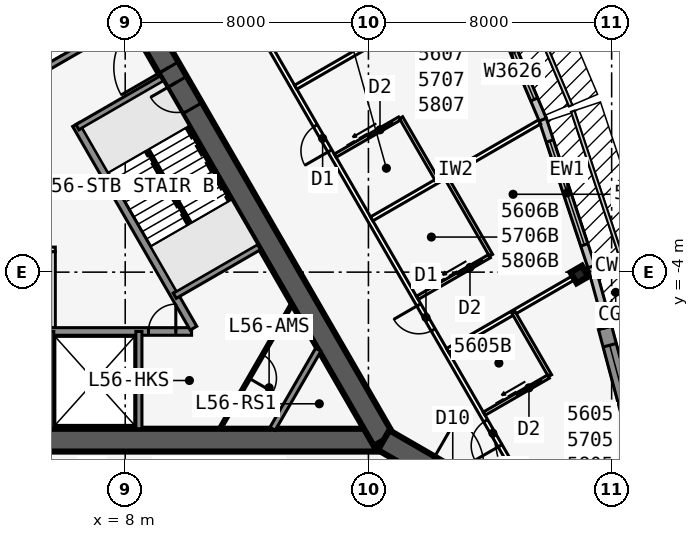
"""IFC4 building model, lengths in metres.
Left out: names, types, materials, properties, quantities, classifications, styles, units other than length and angle.
Written with IfcOpenShell. Run it as: python <this file> out.ifc"""

import sys

from ifc_helpers import new_model, si_unit, direction, frame, frame_2d, origin, origin_2d, place, context, subcontext, project, spatial, polyline, rectangle, i_section, outline, extrude, element, fill, save


model = new_model("IFC4")
c1 = context("Model", 3, precision=1e-05, world=origin(), true_north=direction((0.0, 1.0)))
c2 = subcontext(c1, "Body", "Model", "MODEL_VIEW")
j1 = project(units=[si_unit("LENGTHUNIT", "METRE"), si_unit("PLANEANGLEUNIT", "RADIAN")], contexts=[c1])
p1 = place(None, origin())
s1 = spatial("IfcSite", under=j1, at=p1, CompositionType="ELEMENT")
p2 = place(p1, origin())
s2 = spatial("IfcBuilding", under=s1, at=p2, CompositionType="ELEMENT")
p3 = place(p2, frame((0.0, 0.0, 211.7)))
s3 = spatial("IfcBuildingStorey", under=s2, at=p3, CompositionType="ELEMENT", Elevation=211.7)
p4 = place(p3, frame((-16.5, -9.526, 0.0), z_axis=(0.0, 0.0, 1.0), x_axis=(1.0, 0.0, 0.0)))
e1 = element("IfcWall", 1, at=p4, inside=s3, PredefinedType="SHEAR", context=c2, shape_type="SweptSolid", body=[
    extrude(rectangle(XDim=33.0, YDim=0.75, at=frame_2d((16.5, 0.0))), origin(), (0.0, 0.0, 1.0), 3.6),
])
p5 = place(p4, frame((14.05, 0.0, 0.0)))
e2 = element("IfcOpeningElement", 2, at=p5, cuts=e1, PredefinedType="OPENING", context=c2, shape_type="SweptSolid", body=[
    extrude(rectangle(XDim=1.8, YDim=2.13, at=frame_2d((0.9, 1.065))), frame((0.0, 0.385, 0.0), z_axis=(0.0, -1.0, 0.0), x_axis=(1.0, 0.0, 0.0)), (0.0, 0.0, 1.0), 0.77),
])
p6 = place(p3, frame((-0.55, -5.951, 0.0), z_axis=(0.0, 0.0, 1.0), x_axis=(1.0, 0.0, 0.0)))
e3 = element("IfcWall", 3, at=p6, inside=s3, PredefinedType="SOLIDWALL", context=c2, shape_type="SweptSolid", body=[
    extrude(rectangle(XDim=10.733, YDim=0.25, at=frame_2d((5.366, 0.0))), origin(), (0.0, 0.0, 1.0), 3.435),
])
p7 = place(p6, frame((9.314, 0.0, 0.0)))
e4 = element("IfcOpeningElement", 4, at=p7, cuts=e3, PredefinedType="OPENING", context=c2, shape_type="SweptSolid", body=[
    extrude(rectangle(XDim=0.9, YDim=2.13, at=frame_2d((0.45, 1.065))), frame((0.0, 0.135, 0.0), z_axis=(0.0, -1.0, 0.0), x_axis=(1.0, 0.0, 0.0)), (0.0, 0.0, 1.0), 0.27),
])
p8 = place(p6, frame((1.05, 0.0, 0.0)))
e5 = element("IfcOpeningElement", 5, at=p8, cuts=e3, PredefinedType="OPENING", context=c2, shape_type="SweptSolid", body=[
    extrude(rectangle(XDim=1.1, YDim=2.13, at=frame_2d((0.55, 1.065))), frame((0.0, 0.135, 0.0), z_axis=(0.0, -1.0, 0.0), x_axis=(1.0, 0.0, 0.0)), (0.0, 0.0, 1.0), 0.27),
])
p9 = place(p6, frame((4.05, 0.0, 0.0)))
e6 = element("IfcOpeningElement", 6, at=p9, cuts=e3, PredefinedType="OPENING", context=c2, shape_type="SweptSolid", body=[
    extrude(rectangle(XDim=1.1, YDim=2.13, at=frame_2d((0.55, 1.065))), frame((0.0, 0.135, 0.0), z_axis=(0.0, -1.0, 0.0), x_axis=(1.0, 0.0, 0.0)), (0.0, 0.0, 1.0), 0.27),
])
for number, where, z_axis, x_axis in (
    (7, (5.55, -5.951, 0.0), (0.0, 0.0, 1.0), (0.0, -1.0, 0.0)),
    (8, (8.45, -5.951, 0.0), (0.0, 0.0, 1.0), (0.0, -1.0, 0.0)),
):
    element("IfcWall", number, at=place(p3, frame(where, z_axis=z_axis, x_axis=x_axis)), inside=s3, PredefinedType="SOLIDWALL", context=c2, shape_type="SweptSolid", body=[
        extrude(rectangle(XDim=3.2, YDim=0.2, at=frame_2d((1.6, 0.0))), origin(), (0.0, 0.0, 1.0), 3.435),
    ])
p10 = place(p3, frame((16.5, -9.526, 0.0), z_axis=(0.0, 0.0, 1.0), x_axis=(-0.499999749417, 0.866025548458, 0.0)))
e9 = element("IfcWall", 9, at=p10, inside=s3, PredefinedType="SHEAR", context=c2, shape_type="SweptSolid", body=[
    extrude(rectangle(XDim=33.0, YDim=0.75, at=frame_2d((16.5, 0.0))), origin(), (0.0, 0.0, 1.0), 3.6),
])
p11 = place(p10, frame((14.15, 0.0, 0.0)))
e10 = element("IfcOpeningElement", 10, at=p11, cuts=e9, PredefinedType="OPENING", context=c2, shape_type="SweptSolid", body=[
    extrude(rectangle(XDim=1.8, YDim=2.13, at=frame_2d((0.9, 1.065))), frame((0.0, 0.385, 0.0), z_axis=(0.0, -1.0, 0.0), x_axis=(1.0, 0.0, 0.0)), (0.0, 0.0, 1.0), 0.77),
])
p12 = place(p10, frame((12.6, 0.0, 0.0)))
e11 = element("IfcOpeningElement", 11, at=p12, cuts=e9, PredefinedType="OPENING", context=c2, shape_type="SweptSolid", body=[
    extrude(rectangle(XDim=1.0, YDim=2.13, at=frame_2d((0.5, 1.065))), frame((0.0, 0.385, 0.0), z_axis=(0.0, -1.0, 0.0), x_axis=(1.0, 0.0, 0.0)), (0.0, 0.0, 1.0), 0.77),
])
p13 = place(p3, frame((10.245, -5.843, 0.0), z_axis=(0.0, 0.0, 1.0), x_axis=(-0.499993009313, 0.866029439822, 0.0)))
e12 = element("IfcWall", 12, at=p13, inside=s3, PredefinedType="SOLIDWALL", context=c2, shape_type="SweptSolid", body=[
    extrude(rectangle(XDim=7.733, YDim=0.25, at=frame_2d((3.866, 0.0))), origin(), (0.0, 0.0, 1.0), 3.435),
])
for number, where, z_axis, x_axis in (
    (13, (9.629, -4.775, 0.0), (0.0, 0.0, 1.0), (0.866, 0.5, 0.0)),
    (14, (6.429, 0.767, 0.0), (0.0, 0.0, 1.0), (0.866, 0.5, 0.0)),
):
    element("IfcWall", number, at=place(p3, frame(where, z_axis=z_axis, x_axis=x_axis)), inside=s3, PredefinedType="SOLIDWALL", context=c2, shape_type="SweptSolid", body=[
        extrude(rectangle(XDim=3.2, YDim=0.2, at=frame_2d((1.6, 0.0))), origin(), (0.0, 0.0, 1.0), 3.435),
    ])
p14 = place(p3, frame((5.329, 2.673, 0.0), z_axis=(0.0, 0.0, 1.0), x_axis=(0.866022944154, 0.50000426018, 0.0)))
e15 = element("IfcWall", 15, at=p14, inside=s3, PredefinedType="SOLIDWALL", context=c2, shape_type="SweptSolid", body=[
    extrude(rectangle(XDim=3.2, YDim=0.2, at=frame_2d((1.6, 0.0))), origin(), (0.0, 0.0, 1.0), 3.435),
])
p15 = place(p3, frame((16.5, -9.526, 0.0), z_axis=(0.0, 0.0, 1.0), x_axis=(0.866031398331, -0.499989616998, 0.0)))
e16 = element("IfcWall", 16, at=p15, inside=s3, PredefinedType="SHEAR", context=c2, shape_type="SweptSolid", body=[
    extrude(rectangle(XDim=4.746, YDim=0.75, at=frame_2d((2.373, 0.0))), origin(), (0.0, 0.0, 1.0), 3.6),
])
p16 = place(p15, frame((1.725, 0.0, 0.0)))
e17 = element("IfcOpeningElement", 17, at=p16, cuts=e16, PredefinedType="OPENING", context=c2, shape_type="SweptSolid", body=[
    extrude(rectangle(XDim=1.8, YDim=2.13, at=frame_2d((0.9, 1.065))), frame((0.0, 0.385, 0.0), z_axis=(0.0, -1.0, 0.0), x_axis=(1.0, 0.0, 0.0)), (0.0, 0.0, 1.0), 0.77),
])
p17 = place(p3, frame((22.937, -4.078, 0.0), z_axis=(0.0, 0.0, 1.0), x_axis=(-0.5, 0.866025403784, 0.0)))
e18 = element("IfcColumn", 18, at=p17, inside=s3, PredefinedType="COLUMN", context=c2, shape_type="SweptSolid", body=[
    extrude(i_section(OverallWidth=0.411, OverallDepth=0.434, WebThickness=0.036, FlangeThickness=0.057, at=origin_2d()), origin(), (0.0, 0.0, 1.0), 3.6),
])
p18 = place(p3, frame((23.783, -13.798, 0.0), z_axis=(0.0, 0.0, 1.0), x_axis=(0.258799282522, 0.96593112144, 0.0)))
e19 = element("IfcWall", 19, at=p18, inside=s3, PredefinedType="SOLIDWALL", context=c2, shape_type="SweptSolid", body=[
    extrude(outline(polyline([(4.184, 0.225), (0.509, 0.225), (0.479, 0.113), (0.059, 0.225), (0.0, 0.225), (0.0, -0.225), (4.184, -0.225), (4.184, 0.225)])), origin(), (0.0, 0.0, 1.0), 3.435),
])
p19 = place(p18, frame((1.071, 0.0, 0.45)))
e20 = element("IfcOpeningElement", 20, at=p19, cuts=e19, PredefinedType="OPENING", context=c2, shape_type="SweptSolid", body=[
    extrude(rectangle(XDim=2.4, YDim=2.6, at=frame_2d((1.2, 1.3))), frame((0.0, 0.235, 0.0), z_axis=(0.0, -1.0, 0.0), x_axis=(1.0, 0.0, 0.0)), (0.0, 0.0, 1.0), 0.47),
])
p20 = place(p3, frame((24.865, -9.873, 0.0), z_axis=(0.0, 0.0, 1.0), x_axis=(-0.258784695888, 0.965935029479, 0.0)))
e21 = element("IfcWall", 21, at=p20, inside=s3, PredefinedType="SOLIDWALL", context=c2, shape_type="SweptSolid", body=[
    extrude(rectangle(XDim=4.184, YDim=0.45, at=frame_2d((2.092, 0.0))), origin(), (0.0, 0.0, 1.0), 3.435),
])
p21 = place(p20, frame((0.592, 0.0, 0.45)))
e22 = element("IfcOpeningElement", 22, at=p21, cuts=e21, PredefinedType="OPENING", context=c2, shape_type="SweptSolid", body=[
    extrude(rectangle(XDim=3.0, YDim=2.6, at=frame_2d((1.5, 1.3))), frame((0.0, 0.235, 0.0), z_axis=(0.0, -1.0, 0.0), x_axis=(1.0, 0.0, 0.0)), (0.0, 0.0, 1.0), 0.47),
])
p22 = place(p3, frame((23.879, -5.806, 0.0), z_axis=(0.0, 0.0, 1.0), x_axis=(-0.262867703986, 0.964831887015, 0.0)))
e23 = element("IfcWall", 23, at=p22, inside=s3, PredefinedType="STANDARD", context=c2, shape_type="SweptSolid", body=[
    extrude(rectangle(XDim=2.068, YDim=0.25, at=frame_2d((1.034, 0.0))), origin(), (0.0, 0.0, 1.0), 3.435),
])
p23 = place(p3, frame((23.338, -3.817, 0.0), z_axis=(0.0, 0.0, 1.0), x_axis=(-0.315108478109, 0.949055660656, 0.0)))
e24 = element("IfcWall", 24, at=p23, inside=s3, PredefinedType="STANDARD", context=c2, shape_type="SweptSolid", body=[
    extrude(rectangle(XDim=5.105, YDim=0.25, at=frame_2d((2.552, 0.0))), origin(), (0.0, 0.0, 1.0), 3.435),
])
p24 = place(p23, frame((0.752, 0.0, 0.45)))
e25 = element("IfcOpeningElement", 25, at=p24, cuts=e24, PredefinedType="OPENING", context=c2, shape_type="SweptSolid", body=[
    extrude(rectangle(XDim=3.6, YDim=2.6, at=frame_2d((1.8, 1.3))), frame((0.0, 0.135, 0.0), z_axis=(0.0, -1.0, 0.0), x_axis=(1.0, 0.0, 0.0)), (0.0, 0.0, 1.0), 0.27),
])
p25 = place(p3, frame((21.733, 1.018, 0.0), z_axis=(0.0, 0.0, 1.0), x_axis=(-0.390096809471, 0.920773848044, 0.0)))
e26 = element("IfcWall", 26, at=p25, inside=s3, PredefinedType="STANDARD", context=c2, shape_type="SweptSolid", body=[
    extrude(rectangle(XDim=5.038, YDim=0.25, at=frame_2d((2.519, 0.0))), origin(), (0.0, 0.0, 1.0), 3.435),
])
p26 = place(p25, frame((0.719, 0.0, 0.45)))
e27 = element("IfcOpeningElement", 27, at=p26, cuts=e26, PredefinedType="OPENING", context=c2, shape_type="SweptSolid", body=[
    extrude(rectangle(XDim=3.6, YDim=2.6, at=frame_2d((1.8, 1.3))), frame((0.0, 0.135, 0.0), z_axis=(0.0, -1.0, 0.0), x_axis=(1.0, 0.0, 0.0)), (0.0, 0.0, 1.0), 0.27),
])
p27 = place(p3, frame((21.661, -12.015, 0.0), z_axis=(0.0, 0.0, 1.0), x_axis=(-0.500000605707, 0.866025054079, 0.0)))
e28 = element("IfcWall", 28, at=p27, inside=s3, PredefinedType="PARTITIONING", context=c2, shape_type="SweptSolid", body=[
    extrude(rectangle(XDim=42.472, YDim=0.15, at=frame_2d((21.236, 0.0))), origin(), (0.0, 0.0, 1.0), 3.435),
])
p28 = place(p27, frame((2.661, 0.0, 0.0)))
e29 = element("IfcOpeningElement", 29, at=p28, cuts=e28, PredefinedType="OPENING", context=c2, shape_type="SweptSolid", body=[
    extrude(rectangle(XDim=0.95, YDim=2.13, at=frame_2d((0.475, 1.065))), frame((0.0, 0.085, 0.0), z_axis=(0.0, -1.0, 0.0), x_axis=(1.0, 0.0, 0.0)), (0.0, 0.0, 1.0), 0.17),
])
p29 = place(p27, frame((7.061, 0.0, 0.0)))
e30 = element("IfcOpeningElement", 30, at=p29, cuts=e28, PredefinedType="OPENING", context=c2, shape_type="SweptSolid", body=[
    extrude(rectangle(XDim=0.95, YDim=2.13, at=frame_2d((0.475, 1.065))), frame((0.0, 0.085, 0.0), z_axis=(0.0, -1.0, 0.0), x_axis=(1.0, 0.0, 0.0)), (0.0, 0.0, 1.0), 0.17),
])
p30 = place(p27, frame((13.861, 0.0, 0.0)))
e31 = element("IfcOpeningElement", 31, at=p30, cuts=e28, PredefinedType="OPENING", context=c2, shape_type="SweptSolid", body=[
    extrude(rectangle(XDim=0.95, YDim=2.13, at=frame_2d((0.475, 1.065))), frame((0.0, 0.085, 0.0), z_axis=(0.0, -1.0, 0.0), x_axis=(1.0, 0.0, 0.0)), (0.0, 0.0, 1.0), 0.17),
])
p31 = place(p27, frame((22.061, 0.0, 0.0)))
e32 = element("IfcOpeningElement", 32, at=p31, cuts=e28, PredefinedType="OPENING", context=c2, shape_type="SweptSolid", body=[
    extrude(rectangle(XDim=0.95, YDim=2.13, at=frame_2d((0.475, 1.065))), frame((0.0, 0.085, 0.0), z_axis=(0.0, -1.0, 0.0), x_axis=(1.0, 0.0, 0.0)), (0.0, 0.0, 1.0), 0.17),
])
p32 = place(p27, frame((28.261, 0.0, 0.0)))
e33 = element("IfcOpeningElement", 33, at=p32, cuts=e28, PredefinedType="OPENING", context=c2, shape_type="SweptSolid", body=[
    extrude(rectangle(XDim=0.95, YDim=2.13, at=frame_2d((0.475, 1.065))), frame((0.0, 0.085, 0.0), z_axis=(0.0, -1.0, 0.0), x_axis=(1.0, 0.0, 0.0)), (0.0, 0.0, 1.0), 0.17),
])
p33 = place(p27, frame((38.861, 0.0, 0.0)))
e34 = element("IfcOpeningElement", 34, at=p33, cuts=e28, PredefinedType="OPENING", context=c2, shape_type="SweptSolid", body=[
    extrude(rectangle(XDim=0.95, YDim=2.13, at=frame_2d((0.475, 1.065))), frame((0.0, 0.085, 0.0), z_axis=(0.0, -1.0, 0.0), x_axis=(1.0, 0.0, 0.0)), (0.0, 0.0, 1.0), 0.17),
])
p34 = place(p3, frame((18.608, -6.577, 0.0), z_axis=(0.0, 0.0, 1.0), x_axis=(0.866028745538, 0.499994211868, 0.0)))
e35 = element("IfcWall", 35, at=p34, inside=s3, PredefinedType="PARTITIONING", context=c2, shape_type="SweptSolid", body=[
    extrude(rectangle(XDim=5.34, YDim=0.15, at=frame_2d((2.67, 0.0))), origin(), (0.0, 0.0, 1.0), 2.589),
])
p35 = place(p3, frame((16.108, -2.247, 0.0), z_axis=(0.0, 0.0, 1.0), x_axis=(0.866035028144, 0.499983329749, 0.0)))
e36 = element("IfcWall", 36, at=p35, inside=s3, PredefinedType="PARTITIONING", context=c2, shape_type="SweptSolid", body=[
    extrude(rectangle(XDim=6.373, YDim=0.15, at=frame_2d((3.187, 0.0))), origin(), (0.0, 0.0, 1.0), 2.589),
])
p36 = place(p3, frame((13.608, 2.083, 0.0), z_axis=(0.0, 0.0, 1.0), x_axis=(0.866032701937, 0.499987359016, 0.0)))
e37 = element("IfcWall", 37, at=p36, inside=s3, PredefinedType="PARTITIONING", context=c2, shape_type="SweptSolid", body=[
    extrude(rectangle(XDim=6.994, YDim=0.15, at=frame_2d((3.497, 0.0))), origin(), (0.0, 0.0, 1.0), 2.589),
])
p37 = place(p3, frame((21.973, -7.406, 0.0), z_axis=(0.0, 0.0, 1.0), x_axis=(-0.499957262057, 0.866050077142, 0.0)))
e38 = element("IfcWall", 38, at=p37, inside=s3, PredefinedType="PLUMBINGWALL", context=c2, shape_type="SweptSolid", body=[
    extrude(rectangle(XDim=2.4, YDim=0.12, at=frame_2d((1.2, 0.0))), origin(), (0.0, 0.0, 1.0), 3.435),
])
p38 = place(p3, frame((19.808, -8.656, 0.0), z_axis=(0.0, 0.0, 1.0), x_axis=(0.866023955769, 0.500002508028, 0.0)))
e39 = element("IfcWall", 39, at=p38, inside=s3, PredefinedType="PLUMBINGWALL", context=c2, shape_type="SweptSolid", body=[
    extrude(rectangle(XDim=2.44, YDim=0.12, at=frame_2d((1.22, 0.0))), origin(), (0.0, 0.0, 1.0), 3.435),
])
p39 = place(p38, frame((1.25, 0.0, 0.0)))
e40 = element("IfcOpeningElement", 40, at=p39, cuts=e39, PredefinedType="OPENING", context=c2, shape_type="SweptSolid", body=[
    extrude(rectangle(XDim=0.9, YDim=2.13, at=frame_2d((0.45, 1.065))), frame((0.0, 0.07, 0.0), z_axis=(0.0, -1.0, 0.0), x_axis=(1.0, 0.0, 0.0)), (0.0, 0.0, 1.0), 0.14),
])
p40 = place(p3, frame((20.033, -3.445, 0.0), z_axis=(0.0, 0.0, 1.0), x_axis=(-0.499990139034, 0.866031096941, 0.0)))
e41 = element("IfcWall", 41, at=p40, inside=s3, PredefinedType="PLUMBINGWALL", context=c2, shape_type="SweptSolid", body=[
    extrude(rectangle(XDim=3.0, YDim=0.12, at=frame_2d((1.5, 0.0))), origin(), (0.0, 0.0, 1.0), 3.435),
])
p41 = place(p3, frame((17.608, -4.845, 0.0), z_axis=(0.0, 0.0, 1.0), x_axis=(0.865997131366, 0.500048966069, 0.0)))
e42 = element("IfcWall", 42, at=p41, inside=s3, PredefinedType="PLUMBINGWALL", context=c2, shape_type="SweptSolid", body=[
    extrude(rectangle(XDim=2.74, YDim=0.12, at=frame_2d((1.37, 0.0))), origin(), (0.0, 0.0, 1.0), 3.435),
])
p42 = place(p41, frame((1.55, 0.0, 0.0)))
e43 = element("IfcOpeningElement", 43, at=p42, cuts=e42, PredefinedType="OPENING", context=c2, shape_type="SweptSolid", body=[
    extrude(rectangle(XDim=0.9, YDim=2.13, at=frame_2d((0.45, 1.065))), frame((0.0, 0.07, 0.0), z_axis=(0.0, -1.0, 0.0), x_axis=(1.0, 0.0, 0.0)), (0.0, 0.0, 1.0), 0.14),
])
p43 = place(p3, frame((18.273, -0.997, 0.0), z_axis=(0.0, 0.0, 1.0), x_axis=(-0.500001309137, 0.866024647952, 0.0)))
e44 = element("IfcWall", 44, at=p43, inside=s3, PredefinedType="PLUMBINGWALL", context=c2, shape_type="SweptSolid", body=[
    extrude(rectangle(XDim=2.4, YDim=0.12, at=frame_2d((1.2, 0.0))), origin(), (0.0, 0.0, 1.0), 3.435),
])
p44 = place(p3, frame((14.908, -0.169, 0.0), z_axis=(0.0, 0.0, 1.0), x_axis=(0.866023955769, 0.500002508028, 0.0)))
e45 = element("IfcWall", 45, at=p44, inside=s3, PredefinedType="PLUMBINGWALL", context=c2, shape_type="SweptSolid", body=[
    extrude(rectangle(XDim=2.44, YDim=0.12, at=frame_2d((1.22, 0.0))), origin(), (0.0, 0.0, 1.0), 3.435),
])
p45 = place(p44, frame((1.25, 0.0, 0.0)))
e46 = element("IfcOpeningElement", 46, at=p45, cuts=e45, PredefinedType="OPENING", context=c2, shape_type="SweptSolid", body=[
    extrude(rectangle(XDim=0.9, YDim=2.13, at=frame_2d((0.45, 1.065))), frame((0.0, 0.07, 0.0), z_axis=(0.0, -1.0, 0.0), x_axis=(1.0, 0.0, 0.0)), (0.0, 0.0, 1.0), 0.14),
])
p46 = place(p3, frame((-2.65, -3.251, 0.0), z_axis=(0.0, 0.0, 1.0), x_axis=(1.0, 0.0, 0.0)))
e47 = element("IfcWall", 47, at=p46, inside=s3, PredefinedType="PARTITIONING", context=c2, shape_type="SweptSolid", body=[
    extrude(rectangle(XDim=8.35, YDim=0.15, at=frame_2d((4.175, 0.0))), origin(), (0.0, 0.0, 1.0), 3.435),
])
p47 = place(p3, frame((5.625, -5.826, 0.0), z_axis=(0.0, 0.0, 1.0), x_axis=(0.0, 1.0, 0.0)))
e48 = element("IfcWall", 48, at=p47, inside=s3, PredefinedType="PARTITIONING", context=c2, shape_type="SweptSolid", body=[
    extrude(rectangle(XDim=2.5, YDim=0.15, at=frame_2d((1.25, 0.0))), origin(), (0.0, 0.0, 1.0), 3.435),
])
p48 = place(p3, frame((14.349, -6.551, 0.0), z_axis=(0.0, 0.0, 1.0), x_axis=(-0.499952404951, -0.866052881055, 0.0)))
e49 = element("IfcWall", 49, at=p48, inside=s3, PredefinedType="SOLIDWALL", context=c2, shape_type="SweptSolid", body=[
    extrude(rectangle(XDim=3.002, YDim=0.2, at=frame_2d((1.501, 0.0))), origin(), (0.0, 0.0, 1.0), 3.435),
])
p49 = place(p3, frame((13.483, -5.051, 0.0), z_axis=(0.0, 0.0, 1.0), x_axis=(-0.499999210213, -0.866025859768, 0.0)))
e50 = element("IfcWall", 50, at=p49, inside=s3, PredefinedType="PARTITIONING", context=c2, shape_type="SweptSolid", body=[
    extrude(rectangle(XDim=4.734, YDim=0.1, at=frame_2d((2.367, 0.0))), origin(), (0.0, 0.0, 1.0), 3.435),
])
p50 = place(p49, frame((1.917, 0.0, 0.0)))
e51 = element("IfcOpeningElement", 51, at=p50, cuts=e50, PredefinedType="OPENING", context=c2, shape_type="SweptSolid", body=[
    extrude(rectangle(XDim=0.9, YDim=2.13, at=frame_2d((0.45, 1.065))), frame((0.0, 0.06, 0.0), z_axis=(0.0, -1.0, 0.0), x_axis=(1.0, 0.0, 0.0)), (0.0, 0.0, 1.0), 0.12),
])
p51 = place(p3, frame((10.135, -2.401, 0.0), z_axis=(0.0, 0.0, 1.0), x_axis=(-0.499992232847, 0.866029888106, 0.0)))
e52 = element("IfcWall", 52, at=p51, inside=s3, PredefinedType="SOLIDWALL", context=c2, shape_type="SweptSolid", body=[
    extrude(rectangle(XDim=2.794, YDim=0.1, at=frame_2d((1.397, 0.0))), origin(), (0.0, 0.0, 1.0), 3.6),
])
p52 = place(p21, origin())
e53 = element("IfcWindow", 53, at=p52, inside=s3, PartitioningType="SINGLE_PANEL", PredefinedType="WINDOW", context=c2, shape_type="SweptSolid", body=[
    extrude(rectangle(XDim=3.0, YDim=2.6, at=frame_2d((1.5, 1.3))), frame((0.0, 0.03, 0.0), z_axis=(0.0, -1.0, 0.0), x_axis=(1.0, 0.0, 0.0)), (0.0, 0.0, 1.0), 0.06),
])
fill(e22, e53)
p53 = place(p24, origin())
e54 = element("IfcWindow", 54, at=p53, inside=s3, PartitioningType="SINGLE_PANEL", PredefinedType="WINDOW", context=c2, shape_type="SweptSolid", body=[
    extrude(rectangle(XDim=3.6, YDim=2.6, at=frame_2d((1.8, 1.3))), frame((0.0, 0.03, 0.0), z_axis=(0.0, -1.0, 0.0), x_axis=(1.0, 0.0, 0.0)), (0.0, 0.0, 1.0), 0.06),
])
fill(e25, e54)
p54 = place(p26, origin())
e55 = element("IfcWindow", 55, at=p54, inside=s3, PartitioningType="SINGLE_PANEL", PredefinedType="WINDOW", context=c2, shape_type="SweptSolid", body=[
    extrude(rectangle(XDim=3.6, YDim=2.6, at=frame_2d((1.8, 1.3))), frame((0.0, 0.03, 0.0), z_axis=(0.0, -1.0, 0.0), x_axis=(1.0, 0.0, 0.0)), (0.0, 0.0, 1.0), 0.06),
])
fill(e27, e55)
p55 = place(p39, origin())
e56 = element("IfcDoor", 56, at=p55, inside=s3, OperationType="SLIDING_TO_LEFT", PredefinedType="DOOR", context=c2, shape_type="SweptSolid", body=[
    extrude(rectangle(XDim=0.9, YDim=2.13, at=frame_2d((0.45, 1.065))), frame((0.0, 0.025, 0.0), z_axis=(0.0, -1.0, 0.0), x_axis=(1.0, 0.0, 0.0)), (0.0, 0.0, 1.0), 0.05),
])
fill(e40, e56)
p56 = place(p28, origin())
e57 = element("IfcDoor", 57, at=p56, inside=s3, OperationType="SINGLE_SWING_LEFT", PredefinedType="DOOR", context=c2, shape_type="SweptSolid", body=[
    extrude(rectangle(XDim=0.95, YDim=2.13, at=frame_2d((0.475, 1.065))), frame((0.0, 0.025, 0.0), z_axis=(0.0, -1.0, 0.0), x_axis=(1.0, 0.0, 0.0)), (0.0, 0.0, 1.0), 0.05),
])
fill(e29, e57)
p57 = place(p42, origin())
e58 = element("IfcDoor", 58, at=p57, inside=s3, OperationType="SLIDING_TO_LEFT", PredefinedType="DOOR", context=c2, shape_type="SweptSolid", body=[
    extrude(rectangle(XDim=0.9, YDim=2.13, at=frame_2d((0.45, 1.065))), frame((0.0, 0.025, 0.0), z_axis=(0.0, -1.0, 0.0), x_axis=(1.0, 0.0, 0.0)), (0.0, 0.0, 1.0), 0.05),
])
fill(e43, e58)
p58 = place(p29, origin())
e59 = element("IfcDoor", 59, at=p58, inside=s3, OperationType="SINGLE_SWING_RIGHT", PredefinedType="DOOR", context=c2, shape_type="SweptSolid", body=[
    extrude(rectangle(XDim=0.95, YDim=2.13, at=frame_2d((0.475, 1.065))), frame((0.0, 0.025, 0.0), z_axis=(0.0, -1.0, 0.0), x_axis=(1.0, 0.0, 0.0)), (0.0, 0.0, 1.0), 0.05),
])
fill(e30, e59)
p59 = place(p45, origin())
e60 = element("IfcDoor", 60, at=p59, inside=s3, OperationType="SLIDING_TO_LEFT", PredefinedType="DOOR", context=c2, shape_type="SweptSolid", body=[
    extrude(rectangle(XDim=0.9, YDim=2.13, at=frame_2d((0.45, 1.065))), frame((0.0, 0.025, 0.0), z_axis=(0.0, -1.0, 0.0), x_axis=(1.0, 0.0, 0.0)), (0.0, 0.0, 1.0), 0.05),
])
fill(e46, e60)
p60 = place(p30, origin())
e61 = element("IfcDoor", 61, at=p60, inside=s3, OperationType="SINGLE_SWING_LEFT", PredefinedType="DOOR", context=c2, shape_type="SweptSolid", body=[
    extrude(rectangle(XDim=0.95, YDim=2.13, at=frame_2d((0.475, 1.065))), frame((0.0, 0.025, 0.0), z_axis=(0.0, -1.0, 0.0), x_axis=(1.0, 0.0, 0.0)), (0.0, 0.0, 1.0), 0.05),
])
fill(e31, e61)
p61 = place(p11, origin())
e62 = element("IfcDoor", 62, at=p61, inside=s3, OperationType="DOUBLE_DOOR_SINGLE_SWING", PredefinedType="DOOR", context=c2, shape_type="SweptSolid", body=[
    extrude(rectangle(XDim=1.8, YDim=2.13, at=frame_2d((0.9, 1.065))), frame((0.0, 0.025, 0.0), z_axis=(0.0, -1.0, 0.0), x_axis=(1.0, 0.0, 0.0)), (0.0, 0.0, 1.0), 0.05),
])
fill(e10, e62)
p62 = place(p12, origin())
e63 = element("IfcDoor", 63, at=p62, inside=s3, OperationType="SINGLE_SWING_RIGHT", PredefinedType="DOOR", context=c2, shape_type="SweptSolid", body=[
    extrude(rectangle(XDim=1.0, YDim=2.13, at=frame_2d((0.5, 1.065))), frame((0.0, 0.025, 0.0), z_axis=(0.0, -1.0, 0.0), x_axis=(1.0, 0.0, 0.0)), (0.0, 0.0, 1.0), 0.05),
])
fill(e11, e63)
p63 = place(p50, origin())
e64 = element("IfcDoor", 64, at=p63, inside=s3, OperationType="SINGLE_SWING_RIGHT", PredefinedType="DOOR", context=c2, shape_type="SweptSolid", body=[
    extrude(rectangle(XDim=0.9, YDim=2.13, at=frame_2d((0.45, 1.065))), frame((0.0, 0.025, 0.0), z_axis=(0.0, -1.0, 0.0), x_axis=(1.0, 0.0, 0.0)), (0.0, 0.0, 1.0), 0.05),
])
fill(e51, e64)
p64 = place(p7, origin())
e65 = element("IfcDoor", 65, at=p64, inside=s3, OperationType="SINGLE_SWING_RIGHT", PredefinedType="DOOR", context=c2, shape_type="SweptSolid", body=[
    extrude(rectangle(XDim=0.9, YDim=2.13, at=frame_2d((0.45, 1.065))), frame((0.0, 0.025, 0.0), z_axis=(0.0, -1.0, 0.0), x_axis=(1.0, 0.0, 0.0)), (0.0, 0.0, 1.0), 0.05),
])
fill(e4, e65)
save(model, sys.argv[1])
